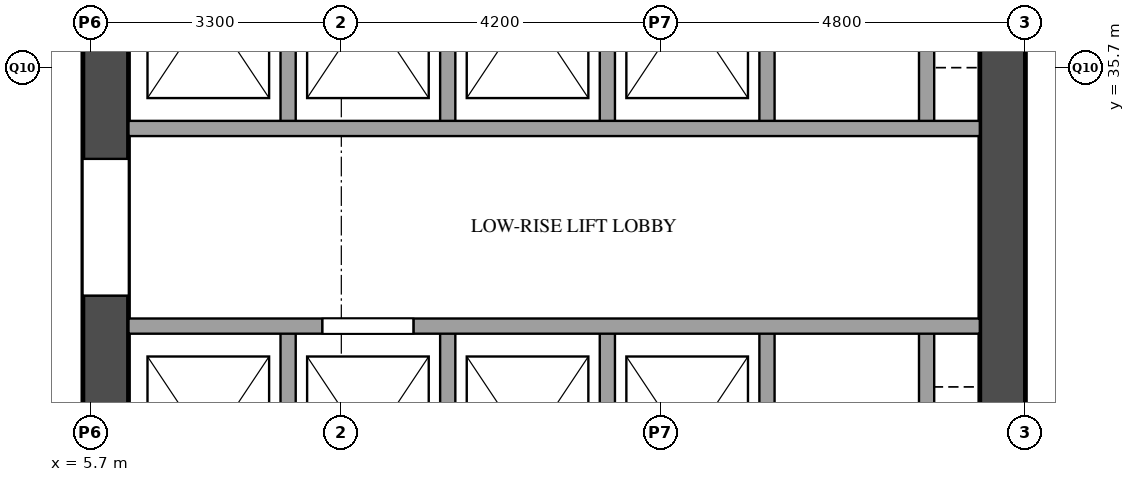
"""IFC4 building model, lengths in metres.
Left out: names, types, materials, properties, quantities, classifications, styles, units other than length and angle.
Written with IfcOpenShell. Run it as: python <this file> out.ifc"""

import sys

from ifc_helpers import new_model, si_unit, direction, frame, frame_2d, origin, place, context, subcontext, project, spatial, rectangle, extrude, element, fill, save


model = new_model("IFC4")
c1 = context("Model", 3, precision=1e-05, world=origin(), true_north=direction((0.0, 1.0)))
c2 = subcontext(c1, "Body", "Model", "MODEL_VIEW")
j1 = project(units=[si_unit("LENGTHUNIT", "METRE"), si_unit("PLANEANGLEUNIT", "RADIAN")], contexts=[c1])
p1 = place(None, origin())
s1 = spatial("IfcSite", under=j1, at=p1, CompositionType="ELEMENT")
p2 = place(p1, origin())
s2 = spatial("IfcBuilding", under=s1, at=p2, CompositionType="ELEMENT")
p3 = place(p2, frame((0.0, 0.0, 31.0)))
s3 = spatial("IfcBuildingStorey", under=s2, at=p3, CompositionType="ELEMENT", Elevation=31.0)
p4 = place(p3, frame((5.9, 29.1, 0.0), z_axis=(0.0, 0.0, 1.0), x_axis=(0.0, 1.0, 0.0)))
e1 = element("IfcWall", 1, at=p4, inside=s3, PredefinedType="SHEAR", context=c2, shape_type="SweptSolid", body=[
    extrude(rectangle(XDim=20.3, YDim=0.6, at=frame_2d((10.15, 0.0))), origin(), (0.0, 0.0, 1.0), 3.5),
])
p5 = place(p4, frame((3.6, 0.0, 0.0)))
e2 = element("IfcOpeningElement", 2, at=p5, cuts=e1, PredefinedType="OPENING", context=c2, shape_type="SweptSolid", body=[
    extrude(rectangle(XDim=1.8, YDim=2.1, at=frame_2d((0.9, 1.05))), frame((0.0, 0.31, 0.0), z_axis=(0.0, -1.0, 0.0), x_axis=(1.0, 0.0, 0.0)), (0.0, 0.0, 1.0), 0.62),
])
p6 = place(p4, frame((16.4, 0.0, 0.0)))
e3 = element("IfcOpeningElement", 3, at=p6, cuts=e1, PredefinedType="OPENING", context=c2, shape_type="SweptSolid", body=[
    extrude(rectangle(XDim=1.0, YDim=2.1, at=frame_2d((0.5, 1.05))), frame((0.0, 0.31, 0.0), z_axis=(0.0, -1.0, 0.0), x_axis=(1.0, 0.0, 0.0)), (0.0, 0.0, 1.0), 0.62),
])
p7 = place(p3, frame((17.7, 29.1, 0.0), z_axis=(0.0, 0.0, 1.0), x_axis=(0.0, 1.0, 0.0)))
e4 = element("IfcWall", 4, at=p7, inside=s3, PredefinedType="SHEAR", context=c2, shape_type="SweptSolid", body=[
    extrude(rectangle(XDim=20.3, YDim=0.6, at=frame_2d((10.15, 0.0))), origin(), (0.0, 0.0, 1.0), 3.5),
])
p8 = place(p7, frame((1.25, 0.0, 0.0)))
e5 = element("IfcOpeningElement", 5, at=p8, cuts=e4, PredefinedType="OPENING", context=c2, shape_type="SweptSolid", body=[
    extrude(rectangle(XDim=0.7, YDim=2.1, at=frame_2d((0.35, 1.05))), frame((0.0, 0.31, 0.0), z_axis=(0.0, -1.0, 0.0), x_axis=(1.0, 0.0, 0.0)), (0.0, 0.0, 1.0), 0.62),
])
p9 = place(p7, frame((7.05, 0.0, 0.0)))
e6 = element("IfcOpeningElement", 6, at=p9, cuts=e4, PredefinedType="OPENING", context=c2, shape_type="SweptSolid", body=[
    extrude(rectangle(XDim=0.7, YDim=2.1, at=frame_2d((0.35, 1.05))), frame((0.0, 0.31, 0.0), z_axis=(0.0, -1.0, 0.0), x_axis=(1.0, 0.0, 0.0)), (0.0, 0.0, 1.0), 0.62),
])
p10 = place(p3, frame((8.3, 29.1, 0.0), z_axis=(0.0, 0.0, 1.0), x_axis=(0.0, 1.0, 0.0)))
e7 = element("IfcWall", 7, at=p10, inside=s3, PredefinedType="SOLIDWALL", context=c2, shape_type="SweptSolid", body=[
    extrude(rectangle(XDim=3.2, YDim=0.2, at=frame_2d((1.6, 0.0))), origin(), (0.0, 0.0, 1.0), 3.5),
])
p11 = place(p3, frame((8.3, 34.9, 0.0), z_axis=(0.0, 0.0, 1.0), x_axis=(0.0, 1.0, 0.0)))
e8 = element("IfcWall", 8, at=p11, inside=s3, PredefinedType="SOLIDWALL", context=c2, shape_type="SweptSolid", body=[
    extrude(rectangle(XDim=3.2, YDim=0.2, at=frame_2d((1.6, 0.0))), origin(), (0.0, 0.0, 1.0), 3.5),
])
p12 = place(p3, frame((10.4, 29.1, 0.0), z_axis=(0.0, 0.0, 1.0), x_axis=(0.0, 1.0, 0.0)))
e9 = element("IfcWall", 9, at=p12, inside=s3, PredefinedType="SOLIDWALL", context=c2, shape_type="SweptSolid", body=[
    extrude(rectangle(XDim=3.2, YDim=0.2, at=frame_2d((1.6, 0.0))), origin(), (0.0, 0.0, 1.0), 3.5),
])
p13 = place(p3, frame((10.4, 34.9, 0.0), z_axis=(0.0, 0.0, 1.0), x_axis=(0.0, 1.0, 0.0)))
e10 = element("IfcWall", 10, at=p13, inside=s3, PredefinedType="SOLIDWALL", context=c2, shape_type="SweptSolid", body=[
    extrude(rectangle(XDim=3.2, YDim=0.2, at=frame_2d((1.6, 0.0))), origin(), (0.0, 0.0, 1.0), 3.5),
])
p14 = place(p3, frame((12.5, 29.1, 0.0), z_axis=(0.0, 0.0, 1.0), x_axis=(0.0, 1.0, 0.0)))
e11 = element("IfcWall", 11, at=p14, inside=s3, PredefinedType="SOLIDWALL", context=c2, shape_type="SweptSolid", body=[
    extrude(rectangle(XDim=3.2, YDim=0.2, at=frame_2d((1.6, 0.0))), origin(), (0.0, 0.0, 1.0), 3.5),
])
p15 = place(p3, frame((12.5, 34.9, 0.0), z_axis=(0.0, 0.0, 1.0), x_axis=(0.0, 1.0, 0.0)))
e12 = element("IfcWall", 12, at=p15, inside=s3, PredefinedType="SOLIDWALL", context=c2, shape_type="SweptSolid", body=[
    extrude(rectangle(XDim=3.2, YDim=0.2, at=frame_2d((1.6, 0.0))), origin(), (0.0, 0.0, 1.0), 3.5),
])
p16 = place(p3, frame((14.6, 29.1, 0.0), z_axis=(0.0, 0.0, 1.0), x_axis=(0.0, 1.0, 0.0)))
e13 = element("IfcWall", 13, at=p16, inside=s3, PredefinedType="SOLIDWALL", context=c2, shape_type="SweptSolid", body=[
    extrude(rectangle(XDim=3.2, YDim=0.2, at=frame_2d((1.6, 0.0))), origin(), (0.0, 0.0, 1.0), 3.5),
])
p17 = place(p3, frame((14.6, 34.9, 0.0), z_axis=(0.0, 0.0, 1.0), x_axis=(0.0, 1.0, 0.0)))
e14 = element("IfcWall", 14, at=p17, inside=s3, PredefinedType="SOLIDWALL", context=c2, shape_type="SweptSolid", body=[
    extrude(rectangle(XDim=3.2, YDim=0.2, at=frame_2d((1.6, 0.0))), origin(), (0.0, 0.0, 1.0), 3.5),
])
p18 = place(p3, frame((16.7, 29.1, 0.0), z_axis=(0.0, 0.0, 1.0), x_axis=(0.0, 1.0, 0.0)))
e15 = element("IfcWall", 15, at=p18, inside=s3, PredefinedType="SOLIDWALL", context=c2, shape_type="SweptSolid", body=[
    extrude(rectangle(XDim=3.2, YDim=0.2, at=frame_2d((1.6, 0.0))), origin(), (0.0, 0.0, 1.0), 3.5),
])
p19 = place(p3, frame((16.7, 34.9, 0.0), z_axis=(0.0, 0.0, 1.0), x_axis=(0.0, 1.0, 0.0)))
e16 = element("IfcWall", 16, at=p19, inside=s3, PredefinedType="SOLIDWALL", context=c2, shape_type="SweptSolid", body=[
    extrude(rectangle(XDim=3.2, YDim=0.2, at=frame_2d((1.6, 0.0))), origin(), (0.0, 0.0, 1.0), 3.5),
])
p20 = place(p3, frame((6.2, 32.3, 0.0), z_axis=(0.0, 0.0, 1.0), x_axis=(1.0, 0.0, 0.0)))
e17 = element("IfcWall", 17, at=p20, inside=s3, PredefinedType="SOLIDWALL", context=c2, shape_type="SweptSolid", body=[
    extrude(rectangle(XDim=11.2, YDim=0.2, at=frame_2d((5.6, 0.0))), origin(), (0.0, 0.0, 1.0), 3.5),
])
p21 = place(p20, frame((2.55, 0.0, 0.0)))
e18 = element("IfcOpeningElement", 18, at=p21, cuts=e17, PredefinedType="OPENING", context=c2, shape_type="SweptSolid", body=[
    extrude(rectangle(XDim=1.2, YDim=2.1, at=frame_2d((0.6, 1.05))), frame((0.0, 0.11, 0.0), z_axis=(0.0, -1.0, 0.0), x_axis=(1.0, 0.0, 0.0)), (0.0, 0.0, 1.0), 0.22),
])
p22 = place(p3, frame((6.2, 34.9, 0.0), z_axis=(0.0, 0.0, 1.0), x_axis=(1.0, 0.0, 0.0)))
e19 = element("IfcWall", 19, at=p22, inside=s3, PredefinedType="SOLIDWALL", context=c2, shape_type="SweptSolid", body=[
    extrude(rectangle(XDim=11.2, YDim=0.2, at=frame_2d((5.6, 0.0))), origin(), (0.0, 0.0, 1.0), 3.5),
])
p23 = place(p21, origin())
e20 = element("IfcDoor", 20, at=p23, inside=s3, OperationType="SLIDING_TO_LEFT", PredefinedType="DOOR", context=c2, shape_type="SweptSolid", body=[
    extrude(rectangle(XDim=1.2, YDim=2.1, at=frame_2d((0.6, 1.05))), frame((0.0, 0.025, 0.0), z_axis=(0.0, -1.0, 0.0), x_axis=(1.0, 0.0, 0.0)), (0.0, 0.0, 1.0), 0.05),
])
fill(e18, e20)
p24 = place(p5, origin())
e21 = element("IfcDoor", 21, at=p24, inside=s3, OperationType="DOUBLE_DOOR_SINGLE_SWING", PredefinedType="DOOR", context=c2, shape_type="SweptSolid", body=[
    extrude(rectangle(XDim=1.8, YDim=2.1, at=frame_2d((0.9, 1.05))), frame((0.0, 0.025, 0.0), z_axis=(0.0, -1.0, 0.0), x_axis=(1.0, 0.0, 0.0)), (0.0, 0.0, 1.0), 0.05),
])
fill(e2, e21)
save(model, sys.argv[1])
